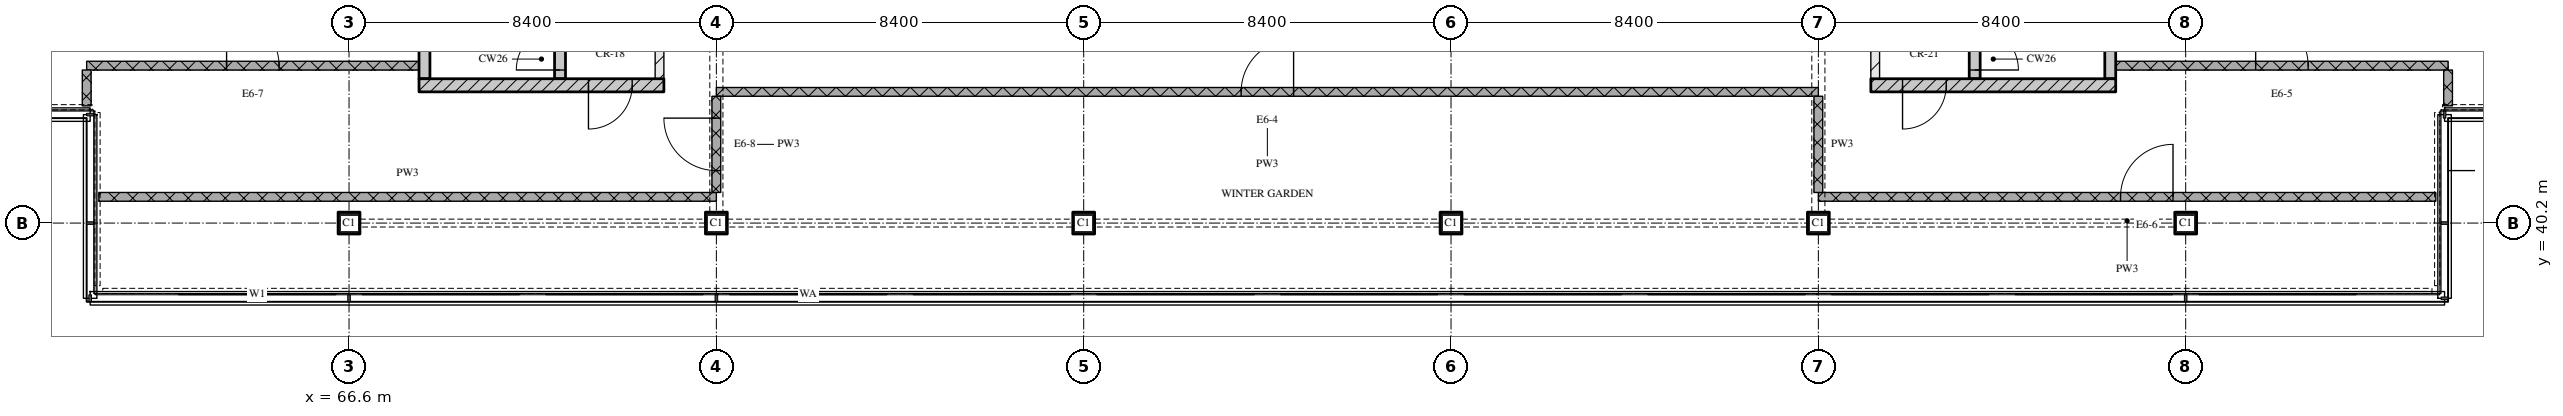
"""IFC4 building model, lengths in metres.
Left out: names, types, materials, properties, quantities, classifications, styles, units other than length and angle.
Written with IfcOpenShell. Run it as: python <this file> out.ifc"""

import sys

from ifc_helpers import new_model, si_unit, direction, frame, frame_2d, origin, origin_2d, place, context, subcontext, project, spatial, rectangle, extrude, element, fill, save


model = new_model("IFC4")
c1 = context("Model", 3, precision=1e-05, world=origin(), true_north=direction((0.0, 1.0)))
c2 = subcontext(c1, "Body", "Model", "MODEL_VIEW")
j1 = project(units=[si_unit("LENGTHUNIT", "METRE"), si_unit("PLANEANGLEUNIT", "RADIAN")], contexts=[c1])
p1 = place(None, origin())
s1 = spatial("IfcSite", under=j1, at=p1, CompositionType="ELEMENT")
p2 = place(p1, origin())
s2 = spatial("IfcBuilding", under=s1, at=p2, CompositionType="ELEMENT")
p3 = place(p2, frame((0.0, 0.0, 299.55)))
s3 = spatial("IfcBuildingStorey", under=s2, at=p3, CompositionType="ELEMENT", Elevation=299.55)
for number, where, z_axis, x_axis in (
    (1, (66.6, 40.2, 0.0), (0.0, 0.0, 1.0), (1.0, 0.0, 0.0)),
    (2, (75.0, 40.2, 0.0), (0.0, 0.0, 1.0), (1.0, 0.0, 0.0)),
    (3, (83.4, 40.2, 0.0), (0.0, 0.0, 1.0), (1.0, 0.0, 0.0)),
    (4, (91.8, 40.2, 0.0), (0.0, 0.0, 1.0), (1.0, 0.0, 0.0)),
    (5, (100.2, 40.2, 0.0), (0.0, 0.0, 1.0), (1.0, 0.0, 0.0)),
    (6, (108.6, 40.2, 0.0), (0.0, 0.0, 1.0), (1.0, 0.0, 0.0)),
):
    element("IfcColumn", number, at=place(p3, frame(where, z_axis=z_axis, x_axis=x_axis)), inside=s3, PredefinedType="COLUMN", context=c2, shape_type="SweptSolid", body=[
        extrude(rectangle(XDim=0.5, YDim=0.5, at=origin_2d()), origin(), (0.0, 0.0, 1.0), 3.6),
    ])
p4 = place(p3, frame((68.2, 43.35, 0.0), z_axis=(0.0, 0.0, 1.0), x_axis=(1.0, 0.0, 0.0)))
e7 = element("IfcWall", 7, at=p4, inside=s3, PredefinedType="SOLIDWALL", context=c2, shape_type="SweptSolid", body=[
    extrude(rectangle(XDim=5.6, YDim=0.3, at=frame_2d((2.8, 0.0))), origin(), (0.0, 0.0, 1.0), 3.32),
])
p5 = place(p4, frame((3.875, 0.0, 0.0)))
e8 = element("IfcOpeningElement", 8, at=p5, cuts=e7, PredefinedType="OPENING", context=c2, shape_type="SweptSolid", body=[
    extrude(rectangle(XDim=1.0, YDim=2.1, at=frame_2d((0.5, 1.05))), frame((0.0, 0.16, 0.0), z_axis=(0.0, -1.0, 0.0), x_axis=(1.0, 0.0, 0.0)), (0.0, 0.0, 1.0), 0.32),
])
p6 = place(p3, frame((68.325, 43.5, 0.0), z_axis=(0.0, 0.0, 1.0), x_axis=(0.0, 1.0, 0.0)))
e9 = element("IfcWall", 9, at=p6, inside=s3, PredefinedType="SOLIDWALL", context=c2, shape_type="SweptSolid", body=[
    extrude(rectangle(XDim=6.9, YDim=0.25, at=frame_2d((3.45, 0.0))), origin(), (0.0, 0.0, 1.0), 3.32),
])
p7 = place(p3, frame((71.425, 43.5, 0.0), z_axis=(0.0, 0.0, 1.0), x_axis=(0.0, 1.0, 0.0)))
e10 = element("IfcWall", 10, at=p7, inside=s3, PredefinedType="SOLIDWALL", context=c2, shape_type="SweptSolid", body=[
    extrude(rectangle(XDim=6.9, YDim=0.25, at=frame_2d((3.45, 0.0))), origin(), (0.0, 0.0, 1.0), 3.32),
])
p8 = place(p7, frame((0.2, 0.0, 0.0)))
e11 = element("IfcOpeningElement", 11, at=p8, cuts=e10, PredefinedType="OPENING", context=c2, shape_type="SweptSolid", body=[
    extrude(rectangle(XDim=1.0, YDim=2.1, at=frame_2d((0.5, 1.05))), frame((0.0, 0.135, 0.0), z_axis=(0.0, -1.0, 0.0), x_axis=(1.0, 0.0, 0.0)), (0.0, 0.0, 1.0), 0.27),
])
p9 = place(p3, frame((73.7, 43.5, 0.0), z_axis=(0.0, 0.0, 1.0), x_axis=(0.0, 1.0, 0.0)))
e12 = element("IfcWall", 12, at=p9, inside=s3, PredefinedType="PARTITIONING", context=c2, shape_type="SweptSolid", body=[
    extrude(rectangle(XDim=6.9, YDim=0.2, at=frame_2d((3.45, 0.0))), origin(), (0.0, 0.0, 1.0), 3.32),
])
p10 = place(p9, frame((1.0, 0.0, 0.0)))
e13 = element("IfcOpeningElement", 13, at=p10, cuts=e12, PredefinedType="OPENING", context=c2, shape_type="SweptSolid", body=[
    extrude(rectangle(XDim=1.0, YDim=2.1, at=frame_2d((0.5, 1.05))), frame((0.0, 0.11, 0.0), z_axis=(0.0, -1.0, 0.0), x_axis=(1.0, 0.0, 0.0)), (0.0, 0.0, 1.0), 0.22),
])
p11 = place(p3, frame((101.4, 43.35, 0.0), z_axis=(0.0, 0.0, 1.0), x_axis=(1.0, 0.0, 0.0)))
e14 = element("IfcWall", 14, at=p11, inside=s3, PredefinedType="SOLIDWALL", context=c2, shape_type="SweptSolid", body=[
    extrude(rectangle(XDim=5.6, YDim=0.3, at=frame_2d((2.8, 0.0))), origin(), (0.0, 0.0, 1.0), 3.32),
])
p12 = place(p11, frame((0.725, 0.0, 0.0)))
e15 = element("IfcOpeningElement", 15, at=p12, cuts=e14, PredefinedType="OPENING", context=c2, shape_type="SweptSolid", body=[
    extrude(rectangle(XDim=1.0, YDim=2.1, at=frame_2d((0.5, 1.05))), frame((0.0, 0.16, 0.0), z_axis=(0.0, -1.0, 0.0), x_axis=(1.0, 0.0, 0.0)), (0.0, 0.0, 1.0), 0.32),
])
p13 = place(p3, frame((101.5, 43.5, 0.0), z_axis=(0.0, 0.0, 1.0), x_axis=(0.0, 1.0, 0.0)))
e16 = element("IfcWall", 16, at=p13, inside=s3, PredefinedType="PARTITIONING", context=c2, shape_type="SweptSolid", body=[
    extrude(rectangle(XDim=6.9, YDim=0.2, at=frame_2d((3.45, 0.0))), origin(), (0.0, 0.0, 1.0), 3.32),
])
p14 = place(p13, frame((1.0, 0.0, 0.0)))
e17 = element("IfcOpeningElement", 17, at=p14, cuts=e16, PredefinedType="OPENING", context=c2, shape_type="SweptSolid", body=[
    extrude(rectangle(XDim=1.0, YDim=2.1, at=frame_2d((0.5, 1.05))), frame((0.0, 0.11, 0.0), z_axis=(0.0, -1.0, 0.0), x_axis=(1.0, 0.0, 0.0)), (0.0, 0.0, 1.0), 0.22),
])
p15 = place(p3, frame((103.775, 43.5, 0.0), z_axis=(0.0, 0.0, 1.0), x_axis=(0.0, 1.0, 0.0)))
e18 = element("IfcWall", 18, at=p15, inside=s3, PredefinedType="SOLIDWALL", context=c2, shape_type="SweptSolid", body=[
    extrude(rectangle(XDim=6.9, YDim=0.25, at=frame_2d((3.45, 0.0))), origin(), (0.0, 0.0, 1.0), 3.32),
])
p16 = place(p15, frame((0.2, 0.0, 0.0)))
e19 = element("IfcOpeningElement", 19, at=p16, cuts=e18, PredefinedType="OPENING", context=c2, shape_type="SweptSolid", body=[
    extrude(rectangle(XDim=1.0, YDim=2.1, at=frame_2d((0.5, 1.05))), frame((0.0, 0.135, 0.0), z_axis=(0.0, -1.0, 0.0), x_axis=(1.0, 0.0, 0.0)), (0.0, 0.0, 1.0), 0.27),
])
p17 = place(p3, frame((106.875, 43.5, 0.0), z_axis=(0.0, 0.0, 1.0), x_axis=(0.0, 1.0, 0.0)))
e20 = element("IfcWall", 20, at=p17, inside=s3, PredefinedType="SOLIDWALL", context=c2, shape_type="SweptSolid", body=[
    extrude(rectangle(XDim=6.9, YDim=0.25, at=frame_2d((3.45, 0.0))), origin(), (0.0, 0.0, 1.0), 3.32),
])
p18 = place(p3, frame((60.88, 40.8, 0.0), z_axis=(0.0, 0.0, 1.0), x_axis=(1.0, 0.0, 0.0)))
e21 = element("IfcWall", 21, at=p18, inside=s3, PredefinedType="PARTITIONING", context=c2, shape_type="SweptSolid", body=[
    extrude(rectangle(XDim=14.12, YDim=0.2, at=frame_2d((7.06, 0.0))), origin(), (0.0, 0.0, 1.0), 3.32),
])
p19 = place(p3, frame((114.32, 40.8, 0.0), z_axis=(0.0, 0.0, 1.0), x_axis=(-1.0, 0.0, 0.0)))
e22 = element("IfcWall", 22, at=p19, inside=s3, PredefinedType="PARTITIONING", context=c2, shape_type="SweptSolid", body=[
    extrude(rectangle(XDim=14.12, YDim=0.2, at=frame_2d((7.06, 0.0))), origin(), (0.0, 0.0, 1.0), 3.32),
])
p20 = place(p19, frame((6.01, 0.0, 0.0)))
e23 = element("IfcOpeningElement", 23, at=p20, cuts=e22, PredefinedType="OPENING", context=c2, shape_type="SweptSolid", body=[
    extrude(rectangle(XDim=1.2, YDim=2.1, at=frame_2d((0.6, 1.05))), frame((0.0, 0.11, 0.0), z_axis=(0.0, -1.0, 0.0), x_axis=(1.0, 0.0, 0.0)), (0.0, 0.0, 1.0), 0.22),
])
p21 = place(p3, frame((100.2, 43.2, 0.0), z_axis=(0.0, 0.0, 1.0), x_axis=(-1.0, 0.0, 0.0)))
e24 = element("IfcWall", 24, at=p21, inside=s3, PredefinedType="PARTITIONING", context=c2, shape_type="SweptSolid", body=[
    extrude(rectangle(XDim=25.2, YDim=0.2, at=frame_2d((12.6, 0.0))), origin(), (0.0, 0.0, 1.0), 3.32),
])
p22 = place(p21, frame((12.0, 0.0, 0.0)))
e25 = element("IfcOpeningElement", 25, at=p22, cuts=e24, PredefinedType="OPENING", context=c2, shape_type="SweptSolid", body=[
    extrude(rectangle(XDim=1.2, YDim=2.1, at=frame_2d((0.6, 1.05))), frame((0.0, 0.11, 0.0), z_axis=(0.0, -1.0, 0.0), x_axis=(1.0, 0.0, 0.0)), (0.0, 0.0, 1.0), 0.22),
])
p23 = place(p3, frame((60.6, 43.8, 0.0), z_axis=(0.0, 0.0, 1.0), x_axis=(1.0, 0.0, 0.0)))
e26 = element("IfcWall", 26, at=p23, inside=s3, PredefinedType="PARTITIONING", context=c2, shape_type="SweptSolid", body=[
    extrude(rectangle(XDim=7.6, YDim=0.2, at=frame_2d((3.8, 0.0))), origin(), (0.0, 0.0, 1.0), 3.32),
])
p24 = place(p23, frame((3.2, 0.0, 0.0)))
e27 = element("IfcOpeningElement", 27, at=p24, cuts=e26, PredefinedType="OPENING", context=c2, shape_type="SweptSolid", body=[
    extrude(rectangle(XDim=1.2, YDim=2.1, at=frame_2d((0.6, 1.05))), frame((0.0, 0.11, 0.0), z_axis=(0.0, -1.0, 0.0), x_axis=(1.0, 0.0, 0.0)), (0.0, 0.0, 1.0), 0.22),
])
p25 = place(p3, frame((107.0, 43.8, 0.0), z_axis=(0.0, 0.0, 1.0), x_axis=(1.0, 0.0, 0.0)))
e28 = element("IfcWall", 28, at=p25, inside=s3, PredefinedType="PARTITIONING", context=c2, shape_type="SweptSolid", body=[
    extrude(rectangle(XDim=7.6, YDim=0.2, at=frame_2d((3.8, 0.0))), origin(), (0.0, 0.0, 1.0), 3.32),
])
p26 = place(p25, frame((3.2, 0.0, 0.0)))
e29 = element("IfcOpeningElement", 29, at=p26, cuts=e28, PredefinedType="OPENING", context=c2, shape_type="SweptSolid", body=[
    extrude(rectangle(XDim=1.2, YDim=2.1, at=frame_2d((0.6, 1.05))), frame((0.0, 0.11, 0.0), z_axis=(0.0, -1.0, 0.0), x_axis=(1.0, 0.0, 0.0)), (0.0, 0.0, 1.0), 0.22),
])
p27 = place(p3, frame((60.6, 43.7, 0.0), z_axis=(0.0, 0.0, 1.0), x_axis=(0.0, -1.0, 0.0)))
e30 = element("IfcWall", 30, at=p27, inside=s3, PredefinedType="PARTITIONING", context=c2, shape_type="SweptSolid", body=[
    extrude(rectangle(XDim=0.82, YDim=0.2, at=frame_2d((0.41, 0.0))), origin(), (0.0, 0.0, 1.0), 3.32),
])
p28 = place(p3, frame((75.0, 43.1, 0.0), z_axis=(0.0, 0.0, 1.0), x_axis=(0.0, -1.0, 0.0)))
e31 = element("IfcWall", 31, at=p28, inside=s3, PredefinedType="PARTITIONING", context=c2, shape_type="SweptSolid", body=[
    extrude(rectangle(XDim=2.2, YDim=0.2, at=frame_2d((1.1, 0.0))), origin(), (0.0, 0.0, 1.0), 2.53),
])
p29 = place(p28, frame((0.5, 0.0, 0.0)))
e32 = element("IfcOpeningElement", 32, at=p29, cuts=e31, PredefinedType="OPENING", context=c2, shape_type="SweptSolid", body=[
    extrude(rectangle(XDim=1.2, YDim=2.1, at=frame_2d((0.6, 1.05))), frame((0.0, 0.11, 0.0), z_axis=(0.0, -1.0, 0.0), x_axis=(1.0, 0.0, 0.0)), (0.0, 0.0, 1.0), 0.22),
])
p30 = place(p3, frame((100.2, 43.1, 0.0), z_axis=(0.0, 0.0, 1.0), x_axis=(0.0, -1.0, 0.0)))
e33 = element("IfcWall", 33, at=p30, inside=s3, PredefinedType="PARTITIONING", context=c2, shape_type="SweptSolid", body=[
    extrude(rectangle(XDim=2.2, YDim=0.2, at=frame_2d((1.1, 0.0))), origin(), (0.0, 0.0, 1.0), 2.53),
])
p31 = place(p3, frame((114.6, 43.7, 0.0), z_axis=(0.0, 0.0, 1.0), x_axis=(0.0, -1.0, 0.0)))
e34 = element("IfcWall", 34, at=p31, inside=s3, PredefinedType="PARTITIONING", context=c2, shape_type="SweptSolid", body=[
    extrude(rectangle(XDim=0.82, YDim=0.2, at=frame_2d((0.41, 0.0))), origin(), (0.0, 0.0, 1.0), 3.32),
])
p32 = place(p5, origin())
e35 = element("IfcDoor", 35, at=p32, inside=s3, OperationType="SINGLE_SWING_RIGHT", PredefinedType="DOOR", context=c2, shape_type="SweptSolid", body=[
    extrude(rectangle(XDim=1.0, YDim=2.1, at=frame_2d((0.5, 1.05))), frame((0.0, 0.025, 0.0), z_axis=(0.0, -1.0, 0.0), x_axis=(1.0, 0.0, 0.0)), (0.0, 0.0, 1.0), 0.05),
])
fill(e8, e35)
p33 = place(p8, origin())
e36 = element("IfcDoor", 36, at=p33, inside=s3, OperationType="SINGLE_SWING_LEFT", PredefinedType="DOOR", context=c2, shape_type="SweptSolid", body=[
    extrude(rectangle(XDim=1.0, YDim=2.1, at=frame_2d((0.5, 1.05))), frame((0.0, 0.025, 0.0), z_axis=(0.0, -1.0, 0.0), x_axis=(1.0, 0.0, 0.0)), (0.0, 0.0, 1.0), 0.05),
])
fill(e11, e36)
p34 = place(p12, origin())
e37 = element("IfcDoor", 37, at=p34, inside=s3, OperationType="SINGLE_SWING_RIGHT", PredefinedType="DOOR", context=c2, shape_type="SweptSolid", body=[
    extrude(rectangle(XDim=1.0, YDim=2.1, at=frame_2d((0.5, 1.05))), frame((0.0, 0.025, 0.0), z_axis=(0.0, -1.0, 0.0), x_axis=(1.0, 0.0, 0.0)), (0.0, 0.0, 1.0), 0.05),
])
fill(e15, e37)
p35 = place(p16, origin())
e38 = element("IfcDoor", 38, at=p35, inside=s3, OperationType="SINGLE_SWING_RIGHT", PredefinedType="DOOR", context=c2, shape_type="SweptSolid", body=[
    extrude(rectangle(XDim=1.0, YDim=2.1, at=frame_2d((0.5, 1.05))), frame((0.0, 0.025, 0.0), z_axis=(0.0, -1.0, 0.0), x_axis=(1.0, 0.0, 0.0)), (0.0, 0.0, 1.0), 0.05),
])
fill(e19, e38)
p36 = place(p20, origin())
e39 = element("IfcDoor", 39, at=p36, inside=s3, OperationType="SINGLE_SWING_RIGHT", PredefinedType="DOOR", context=c2, shape_type="SweptSolid", body=[
    extrude(rectangle(XDim=1.2, YDim=2.1, at=frame_2d((0.6, 1.05))), frame((0.0, 0.025, 0.0), z_axis=(0.0, -1.0, 0.0), x_axis=(1.0, 0.0, 0.0)), (0.0, 0.0, 1.0), 0.05),
])
fill(e23, e39)
p37 = place(p22, origin())
e40 = element("IfcDoor", 40, at=p37, inside=s3, OperationType="SINGLE_SWING_RIGHT", PredefinedType="DOOR", context=c2, shape_type="SweptSolid", body=[
    extrude(rectangle(XDim=1.2, YDim=2.1, at=frame_2d((0.6, 1.05))), frame((0.0, 0.025, 0.0), z_axis=(0.0, -1.0, 0.0), x_axis=(1.0, 0.0, 0.0)), (0.0, 0.0, 1.0), 0.05),
])
fill(e25, e40)
p38 = place(p24, origin())
e41 = element("IfcDoor", 41, at=p38, inside=s3, OperationType="SINGLE_SWING_LEFT", PredefinedType="DOOR", context=c2, shape_type="SweptSolid", body=[
    extrude(rectangle(XDim=1.2, YDim=2.1, at=frame_2d((0.6, 1.05))), frame((0.0, 0.025, 0.0), z_axis=(0.0, -1.0, 0.0), x_axis=(1.0, 0.0, 0.0)), (0.0, 0.0, 1.0), 0.05),
])
fill(e27, e41)
p39 = place(p26, origin())
e42 = element("IfcDoor", 42, at=p39, inside=s3, OperationType="SINGLE_SWING_LEFT", PredefinedType="DOOR", context=c2, shape_type="SweptSolid", body=[
    extrude(rectangle(XDim=1.2, YDim=2.1, at=frame_2d((0.6, 1.05))), frame((0.0, 0.025, 0.0), z_axis=(0.0, -1.0, 0.0), x_axis=(1.0, 0.0, 0.0)), (0.0, 0.0, 1.0), 0.05),
])
fill(e29, e42)
p40 = place(p29, origin())
e43 = element("IfcDoor", 43, at=p40, inside=s3, OperationType="SINGLE_SWING_RIGHT", PredefinedType="DOOR", context=c2, shape_type="SweptSolid", body=[
    extrude(rectangle(XDim=1.2, YDim=2.1, at=frame_2d((0.6, 1.05))), frame((0.0, 0.025, 0.0), z_axis=(0.0, -1.0, 0.0), x_axis=(1.0, 0.0, 0.0)), (0.0, 0.0, 1.0), 0.05),
])
fill(e32, e43)
save(model, sys.argv[1])
